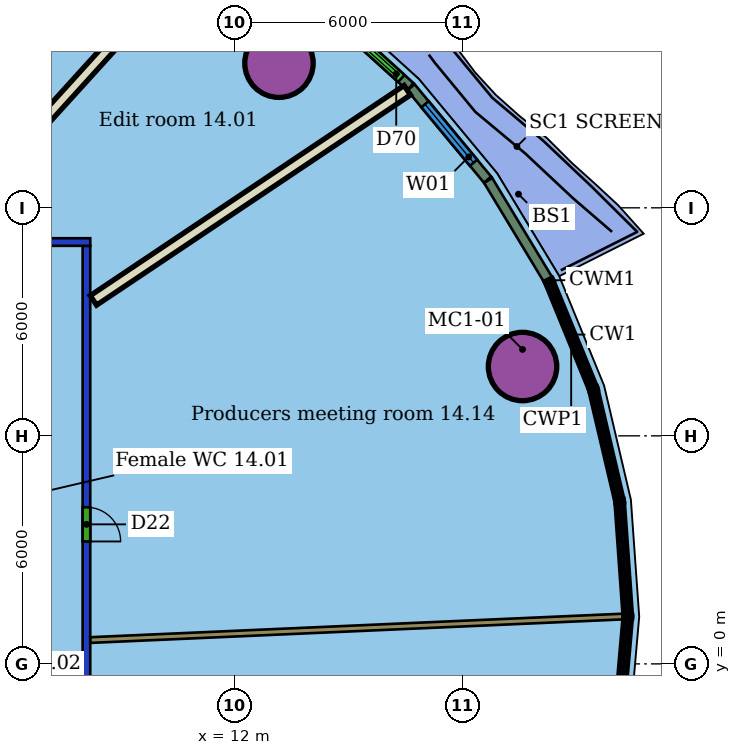
"""IFC4 building model, lengths in metres.
Left out: names, types, materials, properties, quantities, classifications, styles, units other than length and angle.
Written with IfcOpenShell. Run it as: python <this file> out.ifc"""

import sys

from ifc_helpers import new_model, si_unit, direction, frame, frame_2d, origin, origin_2d, place, context, subcontext, project, spatial, rectangle, hollow_circle, extrude, element, fill, save


model = new_model("IFC4")
c1 = context("Model", 3, precision=1e-05, world=origin(), true_north=direction((0.0, 1.0)))
c2 = subcontext(c1, "Body", "Model", "MODEL_VIEW")
j1 = project(units=[si_unit("LENGTHUNIT", "METRE"), si_unit("PLANEANGLEUNIT", "RADIAN")], contexts=[c1])
p1 = place(None, origin())
s1 = spatial("IfcSite", under=j1, at=p1, CompositionType="ELEMENT")
p2 = place(p1, origin())
s2 = spatial("IfcBuilding", under=s1, at=p2, CompositionType="ELEMENT")
p3 = place(p2, frame((0.0, 0.0, 69.3)))
s3 = spatial("IfcBuildingStorey", under=s2, at=p3, CompositionType="ELEMENT", Elevation=69.3)
for number, where, z_axis, x_axis in (
    (1, (19.575, 7.824, 0.0), (0.0, 0.0, 1.0), (1.0, 0.0, 0.0)),
    (2, (13.166, 15.805, 0.0), (0.0, 0.0, 1.0), (1.0, 0.0, 0.0)),
):
    element("IfcColumn", number, at=place(p3, frame(where, z_axis=z_axis, x_axis=x_axis)), inside=s3, PredefinedType="COLUMN", context=c2, shape_type="SweptSolid", body=[
        extrude(hollow_circle(Radius=0.9, WallThickness=0.06, at=origin_2d()), origin(), (0.0, 0.0, 1.0), 3.55),
    ])
p4 = place(p3, frame((-20.2, 11.1, 0.0), z_axis=(0.0, 0.0, 1.0), x_axis=(1.0, 0.0, 0.0)))
e3 = element("IfcWall", 3, at=p4, inside=s3, PredefinedType="PARTITIONING", context=c2, shape_type="SweptSolid", body=[
    extrude(rectangle(XDim=28.4, YDim=0.2, at=frame_2d((14.2, 0.0))), origin(), (0.0, 0.0, 1.0), 2.85),
])
p5 = place(p4, frame((25.412, 0.0, 0.0)))
e4 = element("IfcOpeningElement", 4, at=p5, cuts=e3, PredefinedType="OPENING", context=c2, shape_type="SweptSolid", body=[
    extrude(rectangle(XDim=1.2, YDim=2.1, at=frame_2d((0.6, 1.05))), frame((0.0, 0.11, 0.0), z_axis=(0.0, -1.0, 0.0), x_axis=(1.0, 0.0, 0.0)), (0.0, 0.0, 1.0), 0.22),
])
p6 = place(p4, frame((19.744, 0.0, 0.0)))
e5 = element("IfcOpeningElement", 5, at=p6, cuts=e3, PredefinedType="OPENING", context=c2, shape_type="SweptSolid", body=[
    extrude(rectangle(XDim=1.0, YDim=2.1, at=frame_2d((0.5, 1.05))), frame((0.0, 0.11, 0.0), z_axis=(0.0, -1.0, 0.0), x_axis=(1.0, 0.0, 0.0)), (0.0, 0.0, 1.0), 0.22),
])
p7 = place(p4, frame((15.997, 0.0, 0.0)))
e6 = element("IfcOpeningElement", 6, at=p7, cuts=e3, PredefinedType="OPENING", context=c2, shape_type="SweptSolid", body=[
    extrude(rectangle(XDim=0.9, YDim=2.1, at=frame_2d((0.45, 1.05))), frame((0.0, 0.11, 0.0), z_axis=(0.0, -1.0, 0.0), x_axis=(1.0, 0.0, 0.0)), (0.0, 0.0, 1.0), 0.22),
])
p8 = place(p4, frame((6.537, 0.0, 0.0)))
e7 = element("IfcOpeningElement", 7, at=p8, cuts=e3, PredefinedType="OPENING", context=c2, shape_type="SweptSolid", body=[
    extrude(rectangle(XDim=1.1, YDim=2.1, at=frame_2d((0.55, 1.05))), frame((0.0, 0.11, 0.0), z_axis=(0.0, -1.0, 0.0), x_axis=(1.0, 0.0, 0.0)), (0.0, 0.0, 1.0), 0.22),
])
p9 = place(p3, frame((8.1, 11.0, 0.0), z_axis=(0.0, 0.0, 1.0), x_axis=(0.0, -1.0, 0.0)))
e8 = element("IfcWall", 8, at=p9, inside=s3, PredefinedType="PARTITIONING", context=c2, shape_type="SweptSolid", body=[
    extrude(rectangle(XDim=22.0, YDim=0.2, at=frame_2d((11.0, 0.0))), origin(), (0.0, 0.0, 1.0), 2.85),
])
p10 = place(p9, frame((13.556, 0.0, 0.0)))
e9 = element("IfcOpeningElement", 9, at=p10, cuts=e8, PredefinedType="OPENING", context=c2, shape_type="SweptSolid", body=[
    extrude(rectangle(XDim=1.8, YDim=2.1, at=frame_2d((0.9, 1.05))), frame((0.0, 0.11, 0.0), z_axis=(0.0, -1.0, 0.0), x_axis=(1.0, 0.0, 0.0)), (0.0, 0.0, 1.0), 0.22),
])
p11 = place(p9, frame((6.879, 0.0, 0.0)))
e10 = element("IfcOpeningElement", 10, at=p11, cuts=e8, PredefinedType="OPENING", context=c2, shape_type="SweptSolid", body=[
    extrude(rectangle(XDim=0.9, YDim=2.1, at=frame_2d((0.45, 1.05))), frame((0.0, 0.11, 0.0), z_axis=(0.0, -1.0, 0.0), x_axis=(1.0, 0.0, 0.0)), (0.0, 0.0, 1.0), 0.22),
])
p12 = place(p3, frame((16.542, 15.094, 0.0), z_axis=(0.0, 0.0, 1.0), x_axis=(-0.830929990922, -0.556376985673, 0.0)))
e11 = element("IfcWall", 11, at=p12, inside=s3, PredefinedType="PARTITIONING", context=c2, shape_type="SweptSolid", body=[
    extrude(rectangle(XDim=9.939, YDim=0.3, at=frame_2d((4.969, 0.0))), origin(), (0.0, 0.0, 1.0), 3.55),
])
p13 = place(p3, frame((11.381, 19.16, 0.0), z_axis=(0.0, 0.0, 1.0), x_axis=(-0.671886856771, -0.740653800165, 0.0)))
e12 = element("IfcWall", 12, at=p13, inside=s3, PredefinedType="PARTITIONING", context=c2, shape_type="SweptSolid", body=[
    extrude(rectangle(XDim=10.612, YDim=0.3, at=frame_2d((5.306, 0.0))), origin(), (0.0, 0.0, 1.0), 3.55),
])
p14 = place(p3, frame((22.221, 1.246, 0.0), z_axis=(0.0, 0.0, 1.0), x_axis=(-0.999027479897, -0.044091885989, 0.0)))
e13 = element("IfcWall", 13, at=p14, inside=s3, PredefinedType="PARTITIONING", context=c2, shape_type="SweptSolid", body=[
    extrude(rectangle(XDim=14.031, YDim=0.15, at=frame_2d((7.016, 0.0))), origin(), (0.0, 0.0, 1.0), 3.55),
])
p15 = place(p3, frame((20.246, 10.113, 0.0), z_axis=(0.0, 0.0, 1.0), x_axis=(-0.517204963357, 0.855861569343, 0.0)))
e14 = element("IfcWall", 14, at=p15, inside=s3, PredefinedType="SOLIDWALL", context=c2, shape_type="SweptSolid", body=[
    extrude(rectangle(XDim=3.045, YDim=0.25, at=frame_2d((1.522, 0.0))), origin(), (0.0, 0.0, 1.0), 3.15),
])
p16 = place(p3, frame((18.656, 12.741, 0.0), z_axis=(0.0, 0.0, 1.0), x_axis=(-0.638501311246, 0.769620734867, 0.0)))
e15 = element("IfcWall", 15, at=p16, inside=s3, PredefinedType="SOLIDWALL", context=c2, shape_type="SweptSolid", body=[
    extrude(rectangle(XDim=3.156, YDim=0.25, at=frame_2d((1.578, 0.0))), origin(), (0.0, 0.0, 1.0), 3.15),
])
p17 = place(p16, frame((0.578, 0.0, 0.8)))
e16 = element("IfcOpeningElement", 16, at=p17, cuts=e15, PredefinedType="OPENING", context=c2, shape_type="SweptSolid", body=[
    extrude(rectangle(XDim=2.0, YDim=2.2, at=frame_2d((1.0, 1.1))), frame((0.0, 0.135, 0.0), z_axis=(0.0, -1.0, 0.0), x_axis=(1.0, 0.0, 0.0)), (0.0, 0.0, 1.0), 0.27),
])
p18 = place(p3, frame((16.623, 15.189, 0.0), z_axis=(0.0, 0.0, 1.0), x_axis=(-0.741210741085, 0.671272401712, 0.0)))
e17 = element("IfcWall", 17, at=p18, inside=s3, PredefinedType="SOLIDWALL", context=c2, shape_type="SweptSolid", body=[
    extrude(rectangle(XDim=3.24, YDim=0.25, at=frame_2d((1.62, 0.0))), origin(), (0.0, 0.0, 1.0), 3.15),
])
p19 = place(p18, frame((0.32, 0.0, 0.0)))
e18 = element("IfcOpeningElement", 18, at=p19, cuts=e17, PredefinedType="OPENING", context=c2, shape_type="SweptSolid", body=[
    extrude(rectangle(XDim=1.8, YDim=2.4, at=frame_2d((0.9, 1.2))), frame((0.0, 0.135, 0.0), z_axis=(0.0, -1.0, 0.0), x_axis=(1.0, 0.0, 0.0)), (0.0, 0.0, 1.0), 0.27),
])
p20 = place(p11, origin())
e19 = element("IfcDoor", 19, at=p20, inside=s3, OperationType="SINGLE_SWING_RIGHT", PredefinedType="DOOR", context=c2, shape_type="SweptSolid", body=[
    extrude(rectangle(XDim=0.9, YDim=2.1, at=frame_2d((0.45, 1.05))), frame((0.0, 0.025, 0.0), z_axis=(0.0, -1.0, 0.0), x_axis=(1.0, 0.0, 0.0)), (0.0, 0.0, 1.0), 0.05),
])
fill(e10, e19)
p21 = place(p17, origin())
e20 = element("IfcWindow", 20, at=p21, inside=s3, PartitioningType="SINGLE_PANEL", PredefinedType="WINDOW", context=c2, shape_type="SweptSolid", body=[
    extrude(rectangle(XDim=2.0, YDim=2.2, at=frame_2d((1.0, 1.1))), frame((0.0, 0.03, 0.0), z_axis=(0.0, -1.0, 0.0), x_axis=(1.0, 0.0, 0.0)), (0.0, 0.0, 1.0), 0.06),
])
fill(e16, e20)
p22 = place(p19, origin())
e21 = element("IfcDoor", 21, at=p22, inside=s3, OperationType="DOUBLE_DOOR_SLIDING", PredefinedType="DOOR", context=c2, shape_type="SweptSolid", body=[
    extrude(rectangle(XDim=1.8, YDim=2.4, at=frame_2d((0.9, 1.2))), frame((0.0, 0.025, 0.0), z_axis=(0.0, -1.0, 0.0), x_axis=(1.0, 0.0, 0.0)), (0.0, 0.0, 1.0), 0.05),
])
fill(e18, e21)
save(model, sys.argv[1])
